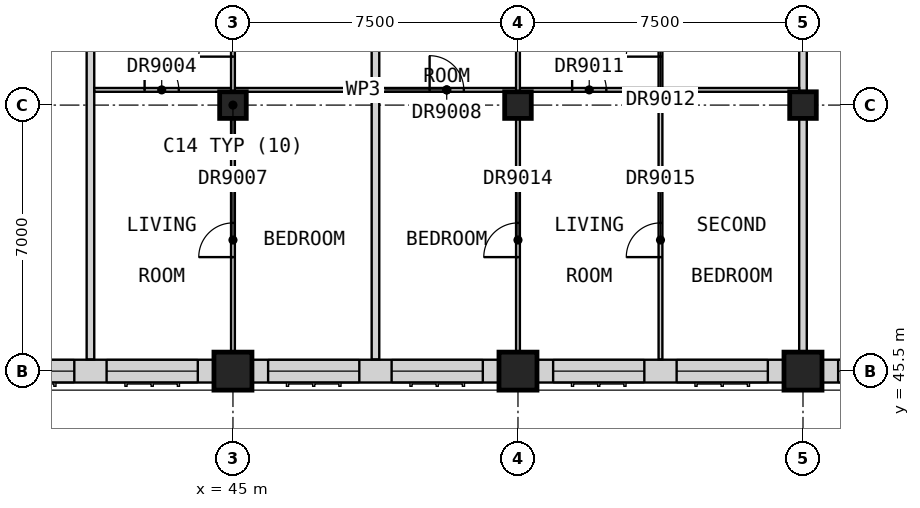
"""IFC4 building model, lengths in metres.
Left out: names, types, materials, properties, quantities, classifications, styles, units other than length and angle.
Written with IfcOpenShell. Run it as: python <this file> out.ifc"""

import sys

from ifc_helpers import new_model, si_unit, direction, frame, frame_2d, origin, origin_2d, place, context, subcontext, project, spatial, rectangle, extrude, element, fill, save


model = new_model("IFC4")
c1 = context("Model", 3, precision=1e-05, world=origin(), true_north=direction((0.0, 1.0)))
c2 = subcontext(c1, "Body", "Model", "MODEL_VIEW")
j1 = project(units=[si_unit("LENGTHUNIT", "METRE"), si_unit("PLANEANGLEUNIT", "RADIAN")], contexts=[c1])
p1 = place(None, origin())
s1 = spatial("IfcSite", under=j1, at=p1, CompositionType="ELEMENT")
p2 = place(p1, origin())
s2 = spatial("IfcBuilding", under=s1, at=p2, CompositionType="ELEMENT")
p3 = place(p2, frame((0.0, 0.0, 280.2)))
s3 = spatial("IfcBuildingStorey", under=s2, at=p3, CompositionType="ELEMENT", Elevation=280.2)
p4 = place(p3, frame((45.0, 45.5, 0.0), z_axis=(0.0, 0.0, 1.0), x_axis=(1.0, 0.0, 0.0)))
e1 = element("IfcColumn", 1, at=p4, inside=s3, PredefinedType="COLUMN", context=c2, shape_type="SweptSolid", body=[
    extrude(rectangle(XDim=1.0, YDim=1.0, at=origin_2d()), origin(), (0.0, 0.0, 1.0), 3.5),
])
p5 = place(p3, frame((45.0, 52.5, 0.0), z_axis=(0.0, 0.0, 1.0), x_axis=(1.0, 0.0, 0.0)))
e2 = element("IfcColumn", 2, at=p5, inside=s3, PredefinedType="COLUMN", context=c2, shape_type="SweptSolid", body=[
    extrude(rectangle(XDim=0.7, YDim=0.7, at=origin_2d()), origin(), (0.0, 0.0, 1.0), 3.5),
])
p6 = place(p3, frame((52.5, 45.5, 0.0), z_axis=(0.0, 0.0, 1.0), x_axis=(1.0, 0.0, 0.0)))
e3 = element("IfcColumn", 3, at=p6, inside=s3, PredefinedType="COLUMN", context=c2, shape_type="SweptSolid", body=[
    extrude(rectangle(XDim=1.0, YDim=1.0, at=origin_2d()), origin(), (0.0, 0.0, 1.0), 3.5),
])
p7 = place(p3, frame((52.5, 52.5, 0.0), z_axis=(0.0, 0.0, 1.0), x_axis=(1.0, 0.0, 0.0)))
e4 = element("IfcColumn", 4, at=p7, inside=s3, PredefinedType="COLUMN", context=c2, shape_type="SweptSolid", body=[
    extrude(rectangle(XDim=0.7, YDim=0.7, at=origin_2d()), origin(), (0.0, 0.0, 1.0), 3.5),
])
p8 = place(p3, frame((60.0, 45.5, 0.0), z_axis=(0.0, 0.0, 1.0), x_axis=(1.0, 0.0, 0.0)))
e5 = element("IfcColumn", 5, at=p8, inside=s3, PredefinedType="COLUMN", context=c2, shape_type="SweptSolid", body=[
    extrude(rectangle(XDim=1.0, YDim=1.0, at=origin_2d()), origin(), (0.0, 0.0, 1.0), 3.5),
])
p9 = place(p3, frame((60.0, 52.5, 0.0), z_axis=(0.0, 0.0, 1.0), x_axis=(1.0, 0.0, 0.0)))
e6 = element("IfcColumn", 6, at=p9, inside=s3, PredefinedType="COLUMN", context=c2, shape_type="SweptSolid", body=[
    extrude(rectangle(XDim=0.7, YDim=0.7, at=origin_2d()), origin(), (0.0, 0.0, 1.0), 3.5),
])
p10 = place(p3, frame((38.0, 45.5, 0.0), z_axis=(0.0, 0.0, 1.0), x_axis=(1.0, 0.0, 0.0)))
e7 = element("IfcWall", 7, at=p10, inside=s3, PredefinedType="SOLIDWALL", context=c2, shape_type="SweptSolid", body=[
    extrude(rectangle(XDim=6.5, YDim=0.6, at=frame_2d((3.25, 0.0))), origin(), (0.0, 0.0, 1.0), 2.75),
])
p11 = place(p10, frame((0.425, 0.0, 0.8)))
e8 = element("IfcOpeningElement", 8, at=p11, cuts=e7, PredefinedType="OPENING", context=c2, shape_type="SweptSolid", body=[
    extrude(rectangle(XDim=2.4, YDim=1.8, at=frame_2d((1.2, 0.9))), frame((0.0, 0.31, 0.0), z_axis=(0.0, -1.0, 0.0), x_axis=(1.0, 0.0, 0.0)), (0.0, 0.0, 1.0), 0.62),
])
p12 = place(p10, frame((3.675, 0.0, 0.8)))
e9 = element("IfcOpeningElement", 9, at=p12, cuts=e7, PredefinedType="OPENING", context=c2, shape_type="SweptSolid", body=[
    extrude(rectangle(XDim=2.4, YDim=1.8, at=frame_2d((1.2, 0.9))), frame((0.0, 0.31, 0.0), z_axis=(0.0, -1.0, 0.0), x_axis=(1.0, 0.0, 0.0)), (0.0, 0.0, 1.0), 0.62),
])
p13 = place(p3, frame((45.5, 45.5, 0.0), z_axis=(0.0, 0.0, 1.0), x_axis=(1.0, 0.0, 0.0)))
e10 = element("IfcWall", 10, at=p13, inside=s3, PredefinedType="SOLIDWALL", context=c2, shape_type="SweptSolid", body=[
    extrude(rectangle(XDim=6.5, YDim=0.6, at=frame_2d((3.25, 0.0))), origin(), (0.0, 0.0, 1.0), 2.75),
])
p14 = place(p13, frame((0.425, 0.0, 0.8)))
e11 = element("IfcOpeningElement", 11, at=p14, cuts=e10, PredefinedType="OPENING", context=c2, shape_type="SweptSolid", body=[
    extrude(rectangle(XDim=2.4, YDim=1.8, at=frame_2d((1.2, 0.9))), frame((0.0, 0.31, 0.0), z_axis=(0.0, -1.0, 0.0), x_axis=(1.0, 0.0, 0.0)), (0.0, 0.0, 1.0), 0.62),
])
p15 = place(p13, frame((3.675, 0.0, 0.8)))
e12 = element("IfcOpeningElement", 12, at=p15, cuts=e10, PredefinedType="OPENING", context=c2, shape_type="SweptSolid", body=[
    extrude(rectangle(XDim=2.4, YDim=1.8, at=frame_2d((1.2, 0.9))), frame((0.0, 0.31, 0.0), z_axis=(0.0, -1.0, 0.0), x_axis=(1.0, 0.0, 0.0)), (0.0, 0.0, 1.0), 0.62),
])
p16 = place(p3, frame((53.0, 45.5, 0.0), z_axis=(0.0, 0.0, 1.0), x_axis=(1.0, 0.0, 0.0)))
e13 = element("IfcWall", 13, at=p16, inside=s3, PredefinedType="SOLIDWALL", context=c2, shape_type="SweptSolid", body=[
    extrude(rectangle(XDim=6.5, YDim=0.6, at=frame_2d((3.25, 0.0))), origin(), (0.0, 0.0, 1.0), 2.75),
])
p17 = place(p16, frame((0.425, 0.0, 0.8)))
e14 = element("IfcOpeningElement", 14, at=p17, cuts=e13, PredefinedType="OPENING", context=c2, shape_type="SweptSolid", body=[
    extrude(rectangle(XDim=2.4, YDim=1.8, at=frame_2d((1.2, 0.9))), frame((0.0, 0.31, 0.0), z_axis=(0.0, -1.0, 0.0), x_axis=(1.0, 0.0, 0.0)), (0.0, 0.0, 1.0), 0.62),
])
p18 = place(p16, frame((3.675, 0.0, 0.8)))
e15 = element("IfcOpeningElement", 15, at=p18, cuts=e13, PredefinedType="OPENING", context=c2, shape_type="SweptSolid", body=[
    extrude(rectangle(XDim=2.4, YDim=1.8, at=frame_2d((1.2, 0.9))), frame((0.0, 0.31, 0.0), z_axis=(0.0, -1.0, 0.0), x_axis=(1.0, 0.0, 0.0)), (0.0, 0.0, 1.0), 0.62),
])
p19 = place(p3, frame((60.5, 45.5, 0.0), z_axis=(0.0, 0.0, 1.0), x_axis=(1.0, 0.0, 0.0)))
e16 = element("IfcWall", 16, at=p19, inside=s3, PredefinedType="SOLIDWALL", context=c2, shape_type="SweptSolid", body=[
    extrude(rectangle(XDim=6.5, YDim=0.6, at=frame_2d((3.25, 0.0))), origin(), (0.0, 0.0, 1.0), 2.75),
])
p20 = place(p19, frame((0.425, 0.0, 0.8)))
e17 = element("IfcOpeningElement", 17, at=p20, cuts=e16, PredefinedType="OPENING", context=c2, shape_type="SweptSolid", body=[
    extrude(rectangle(XDim=2.4, YDim=1.8, at=frame_2d((1.2, 0.9))), frame((0.0, 0.31, 0.0), z_axis=(0.0, -1.0, 0.0), x_axis=(1.0, 0.0, 0.0)), (0.0, 0.0, 1.0), 0.62),
])
p21 = place(p19, frame((3.675, 0.0, 0.8)))
e18 = element("IfcOpeningElement", 18, at=p21, cuts=e16, PredefinedType="OPENING", context=c2, shape_type="SweptSolid", body=[
    extrude(rectangle(XDim=2.4, YDim=1.8, at=frame_2d((1.2, 0.9))), frame((0.0, 0.31, 0.0), z_axis=(0.0, -1.0, 0.0), x_axis=(1.0, 0.0, 0.0)), (0.0, 0.0, 1.0), 0.62),
])
for number, where, z_axis, x_axis in (
    (19, (41.25, 45.81, 0.0), (0.0, 0.0, 1.0), (0.0, 1.0, 0.0)),
    (20, (48.75, 45.81, 0.0), (0.0, 0.0, 1.0), (0.0, 1.0, 0.0)),
):
    element("IfcWall", number, at=place(p3, frame(where, z_axis=z_axis, x_axis=x_axis)), inside=s3, PredefinedType="PARTITIONING", context=c2, shape_type="SweptSolid", body=[
        extrude(rectangle(XDim=12.315, YDim=0.2, at=frame_2d((6.157, 0.0))), origin(), (0.0, 0.0, 1.0), 3.25),
    ])
p22 = place(p3, frame((60.0, 45.0, 0.0), z_axis=(0.0, 0.0, 1.0), x_axis=(0.0, 1.0, 0.0)))
e21 = element("IfcWall", 21, at=p22, inside=s3, PredefinedType="PARTITIONING", context=c2, shape_type="SweptSolid", body=[
    extrude(rectangle(XDim=13.125, YDim=0.2, at=frame_2d((6.562, 0.0))), origin(), (0.0, 0.0, 1.0), 3.25),
])
p23 = place(p3, frame((41.35, 52.9, 0.0), z_axis=(0.0, 0.0, 1.0), x_axis=(1.0, 0.0, 0.0)))
e22 = element("IfcWall", 22, at=p23, inside=s3, PredefinedType="PARTITIONING", context=c2, shape_type="SweptSolid", body=[
    extrude(rectangle(XDim=18.55, YDim=0.1, at=frame_2d((9.275, 0.0))), origin(), (0.0, 0.0, 1.0), 3.25),
])
p24 = place(p23, frame((1.325, 0.0, 0.0)))
e23 = element("IfcOpeningElement", 23, at=p24, cuts=e22, PredefinedType="OPENING", context=c2, shape_type="SweptSolid", body=[
    extrude(rectangle(XDim=0.9, YDim=2.1, at=frame_2d((0.45, 1.05))), frame((0.0, 0.06, 0.0), z_axis=(0.0, -1.0, 0.0), x_axis=(1.0, 0.0, 0.0)), (0.0, 0.0, 1.0), 0.12),
])
p25 = place(p23, frame((8.825, 0.0, 0.0)))
e24 = element("IfcOpeningElement", 24, at=p25, cuts=e22, PredefinedType="OPENING", context=c2, shape_type="SweptSolid", body=[
    extrude(rectangle(XDim=0.9, YDim=2.1, at=frame_2d((0.45, 1.05))), frame((0.0, 0.06, 0.0), z_axis=(0.0, -1.0, 0.0), x_axis=(1.0, 0.0, 0.0)), (0.0, 0.0, 1.0), 0.12),
])
p26 = place(p23, frame((12.575, 0.0, 0.0)))
e25 = element("IfcOpeningElement", 25, at=p26, cuts=e22, PredefinedType="OPENING", context=c2, shape_type="SweptSolid", body=[
    extrude(rectangle(XDim=0.9, YDim=2.1, at=frame_2d((0.45, 1.05))), frame((0.0, 0.06, 0.0), z_axis=(0.0, -1.0, 0.0), x_axis=(1.0, 0.0, 0.0)), (0.0, 0.0, 1.0), 0.12),
])
p27 = place(p3, frame((45.0, 45.0, 0.0), z_axis=(0.0, 0.0, 1.0), x_axis=(0.0, 1.0, 0.0)))
e26 = element("IfcWall", 26, at=p27, inside=s3, PredefinedType="PARTITIONING", context=c2, shape_type="SweptSolid", body=[
    extrude(rectangle(XDim=10.488, YDim=0.1, at=frame_2d((5.244, 0.0))), origin(), (0.0, 0.0, 1.0), 3.25),
])
p28 = place(p27, frame((8.775, 0.0, 0.0)))
e27 = element("IfcOpeningElement", 27, at=p28, cuts=e26, PredefinedType="OPENING", context=c2, shape_type="SweptSolid", body=[
    extrude(rectangle(XDim=0.9, YDim=2.1, at=frame_2d((0.45, 1.05))), frame((0.0, 0.06, 0.0), z_axis=(0.0, -1.0, 0.0), x_axis=(1.0, 0.0, 0.0)), (0.0, 0.0, 1.0), 0.12),
])
p29 = place(p27, frame((3.5, 0.0, 0.0)))
e28 = element("IfcOpeningElement", 28, at=p29, cuts=e26, PredefinedType="OPENING", context=c2, shape_type="SweptSolid", body=[
    extrude(rectangle(XDim=0.9, YDim=2.1, at=frame_2d((0.45, 1.05))), frame((0.0, 0.06, 0.0), z_axis=(0.0, -1.0, 0.0), x_axis=(1.0, 0.0, 0.0)), (0.0, 0.0, 1.0), 0.12),
])
p30 = place(p3, frame((52.5, 45.0, 0.0), z_axis=(0.0, 0.0, 1.0), x_axis=(0.0, 1.0, 0.0)))
e29 = element("IfcWall", 29, at=p30, inside=s3, PredefinedType="PARTITIONING", context=c2, shape_type="SweptSolid", body=[
    extrude(rectangle(XDim=10.488, YDim=0.1, at=frame_2d((5.244, 0.0))), origin(), (0.0, 0.0, 1.0), 3.25),
])
p31 = place(p30, frame((3.5, 0.0, 0.0)))
e30 = element("IfcOpeningElement", 30, at=p31, cuts=e29, PredefinedType="OPENING", context=c2, shape_type="SweptSolid", body=[
    extrude(rectangle(XDim=0.9, YDim=2.1, at=frame_2d((0.45, 1.05))), frame((0.0, 0.06, 0.0), z_axis=(0.0, -1.0, 0.0), x_axis=(1.0, 0.0, 0.0)), (0.0, 0.0, 1.0), 0.12),
])
p32 = place(p3, frame((56.25, 45.81, 0.0), z_axis=(0.0, 0.0, 1.0), x_axis=(0.0, 1.0, 0.0)))
e31 = element("IfcWall", 31, at=p32, inside=s3, PredefinedType="PARTITIONING", context=c2, shape_type="SweptSolid", body=[
    extrude(rectangle(XDim=9.677, YDim=0.1, at=frame_2d((4.839, 0.0))), origin(), (0.0, 0.0, 1.0), 3.25),
])
p33 = place(p32, frame((7.965, 0.0, 0.0)))
e32 = element("IfcOpeningElement", 32, at=p33, cuts=e31, PredefinedType="OPENING", context=c2, shape_type="SweptSolid", body=[
    extrude(rectangle(XDim=0.9, YDim=2.1, at=frame_2d((0.45, 1.05))), frame((0.0, 0.06, 0.0), z_axis=(0.0, -1.0, 0.0), x_axis=(1.0, 0.0, 0.0)), (0.0, 0.0, 1.0), 0.12),
])
p34 = place(p32, frame((2.69, 0.0, 0.0)))
e33 = element("IfcOpeningElement", 33, at=p34, cuts=e31, PredefinedType="OPENING", context=c2, shape_type="SweptSolid", body=[
    extrude(rectangle(XDim=0.9, YDim=2.1, at=frame_2d((0.45, 1.05))), frame((0.0, 0.06, 0.0), z_axis=(0.0, -1.0, 0.0), x_axis=(1.0, 0.0, 0.0)), (0.0, 0.0, 1.0), 0.12),
])
p35 = place(p11, origin())
e34 = element("IfcWindow", 34, at=p35, inside=s3, PartitioningType="SINGLE_PANEL", PredefinedType="WINDOW", context=c2, shape_type="SweptSolid", body=[
    extrude(rectangle(XDim=2.4, YDim=1.8, at=frame_2d((1.2, 0.9))), frame((0.0, -0.07, 0.0), z_axis=(0.0, -1.0, 0.0), x_axis=(1.0, 0.0, 0.0)), (0.0, 0.0, 1.0), 0.06),
])
fill(e8, e34)
p36 = place(p12, origin())
e35 = element("IfcWindow", 35, at=p36, inside=s3, PartitioningType="SINGLE_PANEL", PredefinedType="WINDOW", context=c2, shape_type="SweptSolid", body=[
    extrude(rectangle(XDim=2.4, YDim=1.8, at=frame_2d((1.2, 0.9))), frame((0.0, -0.07, 0.0), z_axis=(0.0, -1.0, 0.0), x_axis=(1.0, 0.0, 0.0)), (0.0, 0.0, 1.0), 0.06),
])
fill(e9, e35)
p37 = place(p14, origin())
e36 = element("IfcWindow", 36, at=p37, inside=s3, PartitioningType="SINGLE_PANEL", PredefinedType="WINDOW", context=c2, shape_type="SweptSolid", body=[
    extrude(rectangle(XDim=2.4, YDim=1.8, at=frame_2d((1.2, 0.9))), frame((0.0, -0.07, 0.0), z_axis=(0.0, -1.0, 0.0), x_axis=(1.0, 0.0, 0.0)), (0.0, 0.0, 1.0), 0.06),
])
fill(e11, e36)
p38 = place(p15, origin())
e37 = element("IfcWindow", 37, at=p38, inside=s3, PartitioningType="SINGLE_PANEL", PredefinedType="WINDOW", context=c2, shape_type="SweptSolid", body=[
    extrude(rectangle(XDim=2.4, YDim=1.8, at=frame_2d((1.2, 0.9))), frame((0.0, -0.07, 0.0), z_axis=(0.0, -1.0, 0.0), x_axis=(1.0, 0.0, 0.0)), (0.0, 0.0, 1.0), 0.06),
])
fill(e12, e37)
p39 = place(p17, origin())
e38 = element("IfcWindow", 38, at=p39, inside=s3, PartitioningType="SINGLE_PANEL", PredefinedType="WINDOW", context=c2, shape_type="SweptSolid", body=[
    extrude(rectangle(XDim=2.4, YDim=1.8, at=frame_2d((1.2, 0.9))), frame((0.0, -0.07, 0.0), z_axis=(0.0, -1.0, 0.0), x_axis=(1.0, 0.0, 0.0)), (0.0, 0.0, 1.0), 0.06),
])
fill(e14, e38)
p40 = place(p18, origin())
e39 = element("IfcWindow", 39, at=p40, inside=s3, PartitioningType="SINGLE_PANEL", PredefinedType="WINDOW", context=c2, shape_type="SweptSolid", body=[
    extrude(rectangle(XDim=2.4, YDim=1.8, at=frame_2d((1.2, 0.9))), frame((0.0, -0.07, 0.0), z_axis=(0.0, -1.0, 0.0), x_axis=(1.0, 0.0, 0.0)), (0.0, 0.0, 1.0), 0.06),
])
fill(e15, e39)
p41 = place(p20, origin())
e40 = element("IfcWindow", 40, at=p41, inside=s3, PartitioningType="SINGLE_PANEL", PredefinedType="WINDOW", context=c2, shape_type="SweptSolid", body=[
    extrude(rectangle(XDim=2.4, YDim=1.8, at=frame_2d((1.2, 0.9))), frame((0.0, -0.07, 0.0), z_axis=(0.0, -1.0, 0.0), x_axis=(1.0, 0.0, 0.0)), (0.0, 0.0, 1.0), 0.06),
])
fill(e17, e40)
p42 = place(p24, origin())
e41 = element("IfcDoor", 41, at=p42, inside=s3, OperationType="SINGLE_SWING_LEFT", PredefinedType="DOOR", context=c2, shape_type="SweptSolid", body=[
    extrude(rectangle(XDim=0.9, YDim=2.1, at=frame_2d((0.45, 1.05))), frame((0.0, 0.025, 0.0), z_axis=(0.0, -1.0, 0.0), x_axis=(1.0, 0.0, 0.0)), (0.0, 0.0, 1.0), 0.05),
])
fill(e23, e41)
p43 = place(p28, origin())
e42 = element("IfcDoor", 42, at=p43, inside=s3, OperationType="SINGLE_SWING_LEFT", PredefinedType="DOOR", context=c2, shape_type="SweptSolid", body=[
    extrude(rectangle(XDim=0.9, YDim=2.1, at=frame_2d((0.45, 1.05))), frame((0.0, 0.025, 0.0), z_axis=(0.0, -1.0, 0.0), x_axis=(1.0, 0.0, 0.0)), (0.0, 0.0, 1.0), 0.05),
])
fill(e27, e42)
p44 = place(p29, origin())
e43 = element("IfcDoor", 43, at=p44, inside=s3, OperationType="SINGLE_SWING_LEFT", PredefinedType="DOOR", context=c2, shape_type="SweptSolid", body=[
    extrude(rectangle(XDim=0.9, YDim=2.1, at=frame_2d((0.45, 1.05))), frame((0.0, 0.025, 0.0), z_axis=(0.0, -1.0, 0.0), x_axis=(1.0, 0.0, 0.0)), (0.0, 0.0, 1.0), 0.05),
])
fill(e28, e43)
p45 = place(p25, origin())
e44 = element("IfcDoor", 44, at=p45, inside=s3, OperationType="SINGLE_SWING_LEFT", PredefinedType="DOOR", context=c2, shape_type="SweptSolid", body=[
    extrude(rectangle(XDim=0.9, YDim=2.1, at=frame_2d((0.45, 1.05))), frame((0.0, 0.025, 0.0), z_axis=(0.0, -1.0, 0.0), x_axis=(1.0, 0.0, 0.0)), (0.0, 0.0, 1.0), 0.05),
])
fill(e24, e44)
p46 = place(p26, origin())
e45 = element("IfcDoor", 45, at=p46, inside=s3, OperationType="SINGLE_SWING_LEFT", PredefinedType="DOOR", context=c2, shape_type="SweptSolid", body=[
    extrude(rectangle(XDim=0.9, YDim=2.1, at=frame_2d((0.45, 1.05))), frame((0.0, 0.025, 0.0), z_axis=(0.0, -1.0, 0.0), x_axis=(1.0, 0.0, 0.0)), (0.0, 0.0, 1.0), 0.05),
])
fill(e25, e45)
p47 = place(p33, origin())
e46 = element("IfcDoor", 46, at=p47, inside=s3, OperationType="SINGLE_SWING_LEFT", PredefinedType="DOOR", context=c2, shape_type="SweptSolid", body=[
    extrude(rectangle(XDim=0.9, YDim=2.1, at=frame_2d((0.45, 1.05))), frame((0.0, 0.025, 0.0), z_axis=(0.0, -1.0, 0.0), x_axis=(1.0, 0.0, 0.0)), (0.0, 0.0, 1.0), 0.05),
])
fill(e32, e46)
p48 = place(p31, origin())
e47 = element("IfcDoor", 47, at=p48, inside=s3, OperationType="SINGLE_SWING_LEFT", PredefinedType="DOOR", context=c2, shape_type="SweptSolid", body=[
    extrude(rectangle(XDim=0.9, YDim=2.1, at=frame_2d((0.45, 1.05))), frame((0.0, 0.025, 0.0), z_axis=(0.0, -1.0, 0.0), x_axis=(1.0, 0.0, 0.0)), (0.0, 0.0, 1.0), 0.05),
])
fill(e30, e47)
p49 = place(p34, origin())
e48 = element("IfcDoor", 48, at=p49, inside=s3, OperationType="SINGLE_SWING_LEFT", PredefinedType="DOOR", context=c2, shape_type="SweptSolid", body=[
    extrude(rectangle(XDim=0.9, YDim=2.1, at=frame_2d((0.45, 1.05))), frame((0.0, 0.025, 0.0), z_axis=(0.0, -1.0, 0.0), x_axis=(1.0, 0.0, 0.0)), (0.0, 0.0, 1.0), 0.05),
])
fill(e33, e48)
save(model, sys.argv[1])
